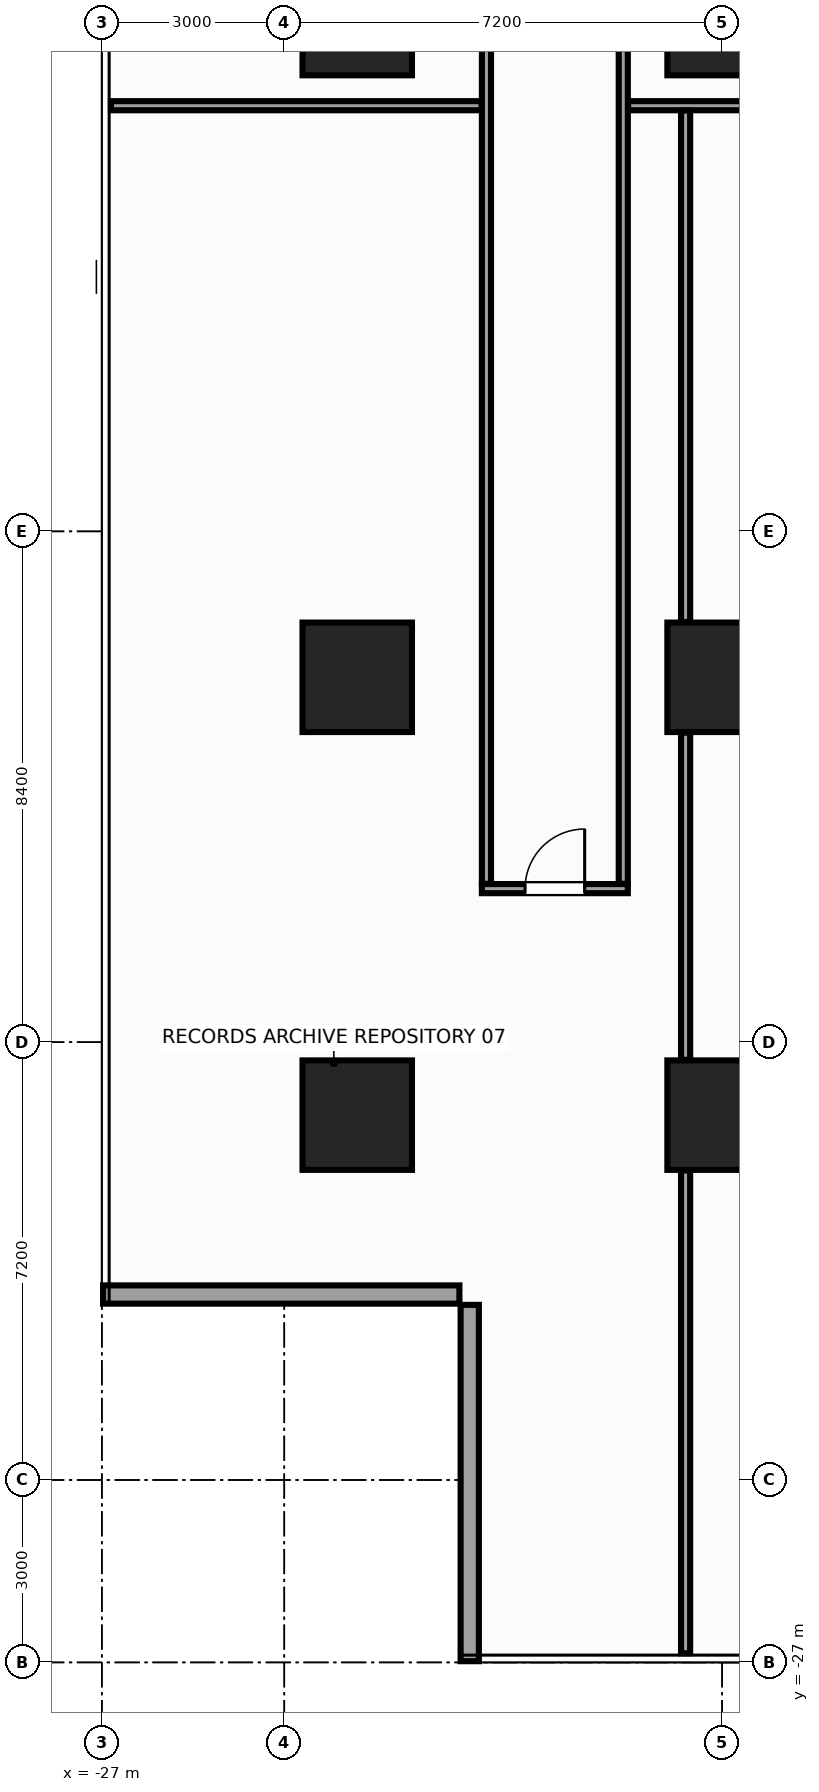
"""IFC4 building model, lengths in metres.
Left out: names, types, materials, properties, quantities, classifications, styles, units other than length and angle.
Written with IfcOpenShell. Run it as: python <this file> out.ifc"""

import sys

from ifc_helpers import new_model, si_unit, direction, frame, frame_2d, origin, origin_2d, place, context, subcontext, project, spatial, rectangle, extrude, source, transform, mapped, element, fill, save


model = new_model("IFC4")
c1 = context("Model", 3, precision=1e-05, world=origin(), true_north=direction((0.0, 1.0)))
c2 = subcontext(c1, "Body", "Model", "MODEL_VIEW")
j1 = project(units=[si_unit("LENGTHUNIT", "METRE"), si_unit("PLANEANGLEUNIT", "RADIAN")], contexts=[c1])
p1 = place(None, origin())
s1 = spatial("IfcSite", under=j1, at=p1, CompositionType="ELEMENT")
p2 = place(p1, origin())
s2 = spatial("IfcBuilding", under=s1, at=p2, CompositionType="ELEMENT")
p3 = place(p2, frame((0.0, 0.0, 52.4)))
s3 = spatial("IfcBuildingStorey", under=s2, at=p3, CompositionType="ELEMENT", Elevation=52.4)
m1 = source(origin(), c2, "Body", "SweptSolid", [
    extrude(rectangle(XDim=1.8, YDim=1.8, at=origin_2d()), origin(), (0.0, 0.0, 1.0), 3.6),
])
for number, where, z_axis, x_axis in (
    (1, (-16.8, -18.0, 0.0), (0.0, 0.0, 1.0), (1.0, 0.0, 0.0)),
    (2, (-16.8, -10.8, 0.0), (0.0, 0.0, 1.0), (1.0, 0.0, 0.0)),
    (3, (-16.8, 0.0, 0.0), (0.0, 0.0, 1.0), (1.0, 0.0, 0.0)),
    (4, (-22.8, -18.0, 0.0), (0.0, 0.0, 1.0), (1.0, 0.0, 0.0)),
    (5, (-22.8, -10.8, 0.0), (0.0, 0.0, 1.0), (1.0, 0.0, 0.0)),
    (6, (-22.8, 0.0, 0.0), (0.0, 0.0, 1.0), (1.0, 0.0, 0.0)),
):
    element("IfcColumn", number, at=place(p3, frame(where, z_axis=z_axis, x_axis=x_axis)), inside=s3, PredefinedType="COLUMN", context=c2, shape_type="MappedRepresentation", body=[
        mapped(m1, transform((0.0, 0.0, 0.0), x_axis=(1.0, 0.0, 0.0), y_axis=(0.0, 1.0, 0.0), z_axis=(0.0, 0.0, 1.0), scale=1.0)),
    ])
m2 = source(origin(), c2, "Body", "SweptSolid", [
    extrude(rectangle(XDim=5.86, YDim=0.3, at=frame_2d((2.93, 0.0))), origin(), (0.0, 0.0, 1.0), 2.74),
])
for number, where, z_axis, x_axis in (
    (7, (-26.98, -20.95, 0.0), (0.0, 0.0, 1.0), (1.0, 0.0, 0.0)),
    (8, (-20.95, -21.12, 0.0), (0.0, 0.0, 1.0), (0.0, -1.0, 0.0)),
):
    element("IfcWall", number, at=place(p3, frame(where, z_axis=z_axis, x_axis=x_axis)), inside=s3, PredefinedType="STANDARD", context=c2, shape_type="MappedRepresentation", body=[
        mapped(m2, transform((0.0, 0.0, 0.0), x_axis=(1.0, 0.0, 0.0), y_axis=(0.0, 1.0, 0.0), z_axis=(0.0, 0.0, 1.0), scale=1.0)),
    ])
m3 = source(origin(), c2, "Body", "SweptSolid", [
    extrude(rectangle(XDim=2.4, YDim=0.15, at=frame_2d((1.2, 0.0))), origin(), (0.0, 0.0, 1.0), 2.985),
])
p4 = place(p3, frame((-20.75, -14.275, 0.0), z_axis=(0.0, 0.0, 1.0), x_axis=(1.0, 0.0, 0.0)))
e9 = element("IfcWall", 9, at=p4, inside=s3, PredefinedType="PARTITIONING", context=c2, shape_type="MappedRepresentation", body=[
    mapped(m3, transform((0.0, 0.0, 0.0), x_axis=(1.0, 0.0, 0.0), y_axis=(0.0, 1.0, 0.0), z_axis=(0.0, 0.0, 1.0), scale=1.0)),
])
p5 = place(p4, frame((0.71, 0.0, 0.0)))
e10 = element("IfcOpeningElement", 10, at=p5, cuts=e9, PredefinedType="OPENING", context=c2, shape_type="SweptSolid", body=[
    extrude(rectangle(XDim=0.98, YDim=2.15, at=frame_2d((0.49, 1.075))), frame((0.0, 0.087, 0.0), z_axis=(0.0, -1.0, 0.0), x_axis=(1.0, 0.0, 0.0)), (0.0, 0.0, 1.0), 0.174),
])
m4 = source(origin(), c2, "Body", "SweptSolid", [
    extrude(rectangle(XDim=24.115, YDim=0.15, at=frame_2d((12.058, 0.0))), origin(), (0.0, 0.0, 1.0), 2.745),
])
p6 = place(p3, frame((-20.675, -14.195, 0.0), z_axis=(0.0, 0.0, 1.0), x_axis=(0.0, 1.0, 0.0)))
e11 = element("IfcWall", 11, at=p6, inside=s3, PredefinedType="PARTITIONING", context=c2, shape_type="MappedRepresentation", body=[
    mapped(m4, transform((0.0, 0.0, 0.0), x_axis=(1.0, 0.0, 0.0), y_axis=(0.0, 1.0, 0.0), z_axis=(0.0, 0.0, 1.0), scale=1.0)),
])
p7 = place(p6, frame((17.942, 0.0, 0.0)))
e12 = element("IfcOpeningElement", 12, at=p7, cuts=e11, PredefinedType="OPENING", context=c2, shape_type="SweptSolid", body=[
    extrude(rectangle(XDim=0.98, YDim=2.15, at=frame_2d((0.49, 1.075))), frame((0.0, 0.087, 0.0), z_axis=(0.0, -1.0, 0.0), x_axis=(1.0, 0.0, 0.0)), (0.0, 0.0, 1.0), 0.174),
])
m5 = source(origin(), c2, "Body", "SweptSolid", [
    extrude(rectangle(XDim=21.995, YDim=0.15, at=frame_2d((10.998, 0.0))), origin(), (0.0, 0.0, 1.0), 2.745),
])
p8 = place(p3, frame((-18.425, -14.195, 0.0), z_axis=(0.0, 0.0, 1.0), x_axis=(0.0, 1.0, 0.0)))
e13 = element("IfcWall", 13, at=p8, inside=s3, PredefinedType="PARTITIONING", context=c2, shape_type="MappedRepresentation", body=[
    mapped(m5, transform((0.0, 0.0, 0.0), x_axis=(1.0, 0.0, 0.0), y_axis=(0.0, 1.0, 0.0), z_axis=(0.0, 0.0, 1.0), scale=1.0)),
])
m6 = source(origin(), c2, "Body", "SweptSolid", [
    extrude(rectangle(XDim=6.095, YDim=0.15, at=frame_2d((3.048, 0.0))), origin(), (0.0, 0.0, 1.0), 2.745),
])
p9 = place(p3, frame((-26.85, -1.4, 0.0), z_axis=(0.0, 0.0, 1.0), x_axis=(1.0, 0.0, 0.0)))
e14 = element("IfcWall", 14, at=p9, inside=s3, PredefinedType="PARTITIONING", context=c2, shape_type="MappedRepresentation", body=[
    mapped(m6, transform((0.0, 0.0, 0.0), x_axis=(1.0, 0.0, 0.0), y_axis=(0.0, 1.0, 0.0), z_axis=(0.0, 0.0, 1.0), scale=1.0)),
])
m7 = source(origin(), c2, "Body", "SweptSolid", [
    extrude(rectangle(XDim=36.69, YDim=0.15, at=frame_2d((18.345, 0.0))), origin(), (0.0, 0.0, 1.0), 2.745),
])
p10 = place(p3, frame((-18.345, -1.4, 0.0), z_axis=(0.0, 0.0, 1.0), x_axis=(1.0, 0.0, 0.0)))
e15 = element("IfcWall", 15, at=p10, inside=s3, PredefinedType="PARTITIONING", context=c2, shape_type="MappedRepresentation", body=[
    mapped(m7, transform((0.0, 0.0, 0.0), x_axis=(1.0, 0.0, 0.0), y_axis=(0.0, 1.0, 0.0), z_axis=(0.0, 0.0, 1.0), scale=1.0)),
])
p11 = place(p10, frame((14.455, 0.0, 0.0)))
e16 = element("IfcOpeningElement", 16, at=p11, cuts=e15, PredefinedType="OPENING", context=c2, shape_type="SweptSolid", body=[
    extrude(rectangle(XDim=0.98, YDim=2.15, at=frame_2d((0.49, 1.075))), frame((0.0, 0.087, 0.0), z_axis=(0.0, -1.0, 0.0), x_axis=(1.0, 0.0, 0.0)), (0.0, 0.0, 1.0), 0.174),
])
p12 = place(p10, frame((4.055, 0.0, 0.0)))
e17 = element("IfcOpeningElement", 17, at=p12, cuts=e15, PredefinedType="OPENING", context=c2, shape_type="SweptSolid", body=[
    extrude(rectangle(XDim=0.98, YDim=2.15, at=frame_2d((0.49, 1.075))), frame((0.0, 0.087, 0.0), z_axis=(0.0, -1.0, 0.0), x_axis=(1.0, 0.0, 0.0)), (0.0, 0.0, 1.0), 0.174),
])
p13 = place(p10, frame((32.415, 0.0, 0.0)))
e18 = element("IfcOpeningElement", 18, at=p13, cuts=e15, PredefinedType="OPENING", context=c2, shape_type="SweptSolid", body=[
    extrude(rectangle(XDim=0.98, YDim=2.15, at=frame_2d((0.49, 1.075))), frame((0.0, 0.087, 0.0), z_axis=(0.0, -1.0, 0.0), x_axis=(1.0, 0.0, 0.0)), (0.0, 0.0, 1.0), 0.174),
])
m8 = source(origin(), c2, "Body", "SweptSolid", [
    extrude(rectangle(XDim=7.94, YDim=0.15, at=frame_2d((3.97, 0.0))), origin(), (0.0, 0.0, 1.0), 3.36),
])
p14 = place(p3, frame((-17.4, -26.85, 0.0), z_axis=(0.0, 0.0, 1.0), x_axis=(0.0, 1.0, 0.0)))
e19 = element("IfcWall", 19, at=p14, inside=s3, PredefinedType="PARTITIONING", context=c2, shape_type="MappedRepresentation", body=[
    mapped(m8, transform((0.0, 0.0, 0.0), x_axis=(1.0, 0.0, 0.0), y_axis=(0.0, 1.0, 0.0), z_axis=(0.0, 0.0, 1.0), scale=1.0)),
])
m9 = source(origin(), c2, "Body", "SweptSolid", [
    extrude(rectangle(XDim=5.38, YDim=0.15, at=frame_2d((2.69, 0.0))), origin(), (0.0, 0.0, 1.0), 3.36),
])
p15 = place(p3, frame((-17.4, -17.09, 0.0), z_axis=(0.0, 0.0, 1.0), x_axis=(0.0, 1.0, 0.0)))
e20 = element("IfcWall", 20, at=p15, inside=s3, PredefinedType="PARTITIONING", context=c2, shape_type="MappedRepresentation", body=[
    mapped(m9, transform((0.0, 0.0, 0.0), x_axis=(1.0, 0.0, 0.0), y_axis=(0.0, 1.0, 0.0), z_axis=(0.0, 0.0, 1.0), scale=1.0)),
])
m10 = source(origin(), c2, "Body", "SweptSolid", [
    extrude(rectangle(XDim=8.41, YDim=0.15, at=frame_2d((4.205, 0.0))), origin(), (0.0, 0.0, 1.0), 3.36),
])
p16 = place(p3, frame((-17.4, -9.89, 0.0), z_axis=(0.0, 0.0, 1.0), x_axis=(0.0, 1.0, 0.0)))
e21 = element("IfcWall", 21, at=p16, inside=s3, PredefinedType="PARTITIONING", context=c2, shape_type="MappedRepresentation", body=[
    mapped(m10, transform((0.0, 0.0, 0.0), x_axis=(1.0, 0.0, 0.0), y_axis=(0.0, 1.0, 0.0), z_axis=(0.0, 0.0, 1.0), scale=1.0)),
])
m11 = source(origin(), c2, "Body", "SweptSolid", [
    extrude(rectangle(XDim=0.98, YDim=2.15, at=frame_2d((0.49, 1.075))), frame((0.0, 0.025, 0.0), z_axis=(0.0, -1.0, 0.0), x_axis=(1.0, 0.0, 0.0)), (0.0, 0.0, 1.0), 0.05),
])
p17 = place(p5, origin())
e22 = element("IfcDoor", 22, at=p17, inside=s3, OperationType="SINGLE_SWING_RIGHT", PredefinedType="DOOR", context=c2, shape_type="MappedRepresentation", body=[
    mapped(m11, transform((0.0, 0.0, 0.0), x_axis=(1.0, 0.0, 0.0), y_axis=(0.0, 1.0, 0.0), z_axis=(0.0, 0.0, 1.0), scale=1.0)),
])
fill(e10, e22)
save(model, sys.argv[1])
